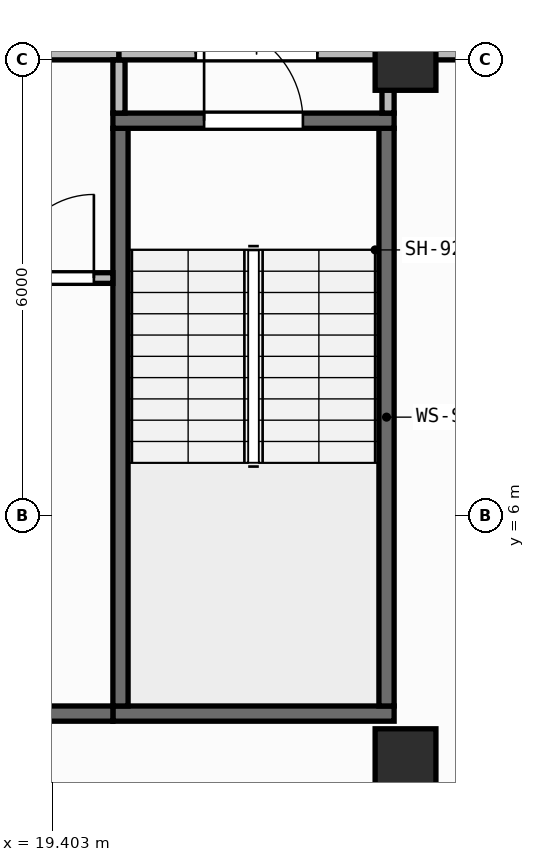
"""IFC4 building model, lengths in metres.
Left out: names, types, materials, properties, quantities, classifications, styles, units other than length and angle.
Written with IfcOpenShell. Run it as: python <this file> out.ifc"""

import sys

from ifc_helpers import new_model, si_unit, direction, frame, frame_2d, origin, origin_2d, place, context, subcontext, project, spatial, rectangle, extrude, element, fill, save


model = new_model("IFC4")
c1 = context("Model", 3, precision=1e-05, world=origin(), true_north=direction((0.0, 1.0)))
c2 = subcontext(c1, "Body", "Model", "MODEL_VIEW")
j1 = project(units=[si_unit("LENGTHUNIT", "METRE"), si_unit("PLANEANGLEUNIT", "RADIAN")], contexts=[c1])
p1 = place(None, origin())
s1 = spatial("IfcSite", under=j1, at=p1, CompositionType="ELEMENT")
p2 = place(p1, origin())
s2 = spatial("IfcBuilding", under=s1, at=p2, CompositionType="ELEMENT")
p3 = place(p2, frame((0.0, 0.0, 256.55)))
s3 = spatial("IfcBuildingStorey", under=s2, at=p3, CompositionType="ELEMENT", Elevation=256.55)
for number, where, z_axis, x_axis in (
    (1, (24.05, 2.8, 0.0), (0.0, 0.0, 1.0), (1.0, 0.0, 0.0)),
    (2, (24.05, 12.0, 0.0), (0.0, 0.0, 1.0), (1.0, 0.0, 0.0)),
):
    element("IfcColumn", number, at=place(p3, frame(where, z_axis=z_axis, x_axis=x_axis)), inside=s3, PredefinedType="COLUMN", context=c2, shape_type="SweptSolid", body=[
        extrude(rectangle(XDim=0.8, YDim=0.8, at=origin_2d()), origin(), (0.0, 0.0, 1.0), 3.95),
    ])
p4 = place(p3, frame((2.56, 0.173, 0.0), z_axis=(0.0, 0.0, 1.0), x_axis=(0.996798206282, 0.079958338856, 0.0)))
e3 = element("IfcWall", 3, at=p4, inside=s3, PredefinedType="STANDARD", context=c2, shape_type="SweptSolid", body=[
    extrude(rectangle(XDim=37.199, YDim=0.26, at=frame_2d((18.6, 0.0))), origin(), (0.0, 0.0, 1.0), 3.71),
])
p5 = place(p4, frame((17.4, 0.0, 0.9)))
e4 = element("IfcOpeningElement", 4, at=p5, cuts=e3, PredefinedType="OPENING", context=c2, shape_type="SweptSolid", body=[
    extrude(rectangle(XDim=2.4, YDim=1.65, at=frame_2d((1.2, 0.825))), frame((0.0, 0.14, 0.0), z_axis=(0.0, -1.0, 0.0), x_axis=(1.0, 0.0, 0.0)), (0.0, 0.0, 1.0), 0.28),
])
p6 = place(p3, frame((20.2, 3.4, 0.0), z_axis=(0.0, 0.0, 1.0), x_axis=(1.0, 0.0, 0.0)))
e5 = element("IfcWall", 5, at=p6, inside=s3, PredefinedType="SHEAR", context=c2, shape_type="SweptSolid", body=[
    extrude(rectangle(XDim=3.7, YDim=0.2, at=frame_2d((1.85, 0.0))), origin(), (0.0, 0.0, 1.0), 3.71),
])
for number, where, z_axis, x_axis in (
    (6, (20.3, 3.5, 0.0), (0.0, 0.0, 1.0), (0.0, 1.0, 0.0)),
    (7, (23.8, 3.5, 0.0), (0.0, 0.0, 1.0), (0.0, 1.0, 0.0)),
):
    element("IfcWall", number, at=place(p3, frame(where, z_axis=z_axis, x_axis=x_axis)), inside=s3, PredefinedType="SHEAR", context=c2, shape_type="SweptSolid", body=[
        extrude(rectangle(XDim=7.6, YDim=0.2, at=frame_2d((3.8, 0.0))), origin(), (0.0, 0.0, 1.0), 3.71),
    ])
p7 = place(p3, frame((20.2, 11.2, 0.0), z_axis=(0.0, 0.0, 1.0), x_axis=(1.0, 0.0, 0.0)))
e8 = element("IfcWall", 8, at=p7, inside=s3, PredefinedType="SHEAR", context=c2, shape_type="SweptSolid", body=[
    extrude(rectangle(XDim=3.7, YDim=0.2, at=frame_2d((1.85, 0.0))), origin(), (0.0, 0.0, 1.0), 3.71),
])
p8 = place(p7, frame((1.2, 0.0, 0.0)))
e9 = element("IfcOpeningElement", 9, at=p8, cuts=e8, PredefinedType="OPENING", context=c2, shape_type="SweptSolid", body=[
    extrude(rectangle(XDim=1.3, YDim=2.15, at=frame_2d((0.65, 1.075))), frame((0.0, 0.11, 0.0), z_axis=(0.0, -1.0, 0.0), x_axis=(1.0, 0.0, 0.0)), (0.0, 0.0, 1.0), 0.22),
])
p9 = place(p3, frame((6.5, 3.4, 0.0), z_axis=(0.0, 0.0, 1.0), x_axis=(1.0, 0.0, 0.0)))
e10 = element("IfcWall", 10, at=p9, inside=s3, PredefinedType="SHEAR", context=c2, shape_type="SweptSolid", body=[
    extrude(rectangle(XDim=13.7, YDim=0.2, at=frame_2d((6.85, 0.0))), origin(), (0.0, 0.0, 1.0), 3.71),
])
p10 = place(p3, frame((18.61, 9.13, 0.0), z_axis=(0.0, 0.0, 1.0), x_axis=(1.0, 0.0, 0.0)))
e11 = element("IfcWall", 11, at=p10, inside=s3, PredefinedType="PARTITIONING", context=c2, shape_type="SweptSolid", body=[
    extrude(rectangle(XDim=1.59, YDim=0.14, at=frame_2d((0.795, 0.0))), origin(), (0.0, 0.0, 1.0), 3.71),
])
p11 = place(p10, frame((0.24, 0.0, 0.0)))
e12 = element("IfcOpeningElement", 12, at=p11, cuts=e11, PredefinedType="OPENING", context=c2, shape_type="SweptSolid", body=[
    extrude(rectangle(XDim=1.1, YDim=2.1, at=frame_2d((0.55, 1.05))), frame((0.0, 0.08, 0.0), z_axis=(0.0, -1.0, 0.0), x_axis=(1.0, 0.0, 0.0)), (0.0, 0.0, 1.0), 0.16),
])
p12 = place(p3, frame((12.58, 12.08, 0.0), z_axis=(0.0, 0.0, 1.0), x_axis=(1.0, 0.0, 0.0)))
e13 = element("IfcWall", 13, at=p12, inside=s3, PredefinedType="PARTITIONING", context=c2, shape_type="SweptSolid", body=[
    extrude(rectangle(XDim=7.7, YDim=0.16, at=frame_2d((3.85, 0.0))), origin(), (0.0, 0.0, 1.0), 3.157),
])
p13 = place(p12, frame((3.05, 0.0, 0.0)))
e14 = element("IfcOpeningElement", 14, at=p13, cuts=e13, PredefinedType="OPENING", context=c2, shape_type="SweptSolid", body=[
    extrude(rectangle(XDim=1.6, YDim=2.05, at=frame_2d((0.8, 1.025))), frame((0.0, 0.09, 0.0), z_axis=(0.0, -1.0, 0.0), x_axis=(1.0, 0.0, 0.0)), (0.0, 0.0, 1.0), 0.18),
])
p14 = place(p3, frame((20.28, 11.3, 0.0), z_axis=(0.0, 0.0, 1.0), x_axis=(0.0, 1.0, 0.0)))
e15 = element("IfcWall", 15, at=p14, inside=s3, PredefinedType="PARTITIONING", context=c2, shape_type="SweptSolid", body=[
    extrude(rectangle(XDim=0.7, YDim=0.16, at=frame_2d((0.35, 0.0))), origin(), (0.0, 0.0, 1.0), 3.71),
])
p15 = place(p3, frame((20.28, 12.08, 0.0), z_axis=(0.0, 0.0, 1.0), x_axis=(1.0, 0.0, 0.0)))
e16 = element("IfcWall", 16, at=p15, inside=s3, PredefinedType="PARTITIONING", context=c2, shape_type="SweptSolid", body=[
    extrude(rectangle(XDim=3.62, YDim=0.16, at=frame_2d((1.81, 0.0))), origin(), (0.0, 0.0, 1.0), 3.157),
])
p16 = place(p15, frame((1.01, 0.0, 0.0)))
e17 = element("IfcOpeningElement", 17, at=p16, cuts=e16, PredefinedType="OPENING", context=c2, shape_type="SweptSolid", body=[
    extrude(rectangle(XDim=1.6, YDim=2.05, at=frame_2d((0.8, 1.025))), frame((0.0, 0.09, 0.0), z_axis=(0.0, -1.0, 0.0), x_axis=(1.0, 0.0, 0.0)), (0.0, 0.0, 1.0), 0.18),
])
p17 = place(p3, frame((23.82, 11.3, 0.0), z_axis=(0.0, 0.0, 1.0), x_axis=(0.0, 1.0, 0.0)))
e18 = element("IfcWall", 18, at=p17, inside=s3, PredefinedType="PARTITIONING", context=c2, shape_type="SweptSolid", body=[
    extrude(rectangle(XDim=0.7, YDim=0.16, at=frame_2d((0.35, 0.0))), origin(), (0.0, 0.0, 1.0), 3.71),
])
p18 = place(p3, frame((24.02, 12.08, 0.0), z_axis=(0.0, 0.0, 1.0), x_axis=(1.0, 0.0, 0.0)))
e19 = element("IfcWall", 19, at=p18, inside=s3, PredefinedType="PARTITIONING", context=c2, shape_type="SweptSolid", body=[
    extrude(rectangle(XDim=1.218, YDim=0.16, at=frame_2d((0.609, 0.0))), origin(), (0.0, 0.0, 1.0), 3.157),
])
p19 = place(p8, origin())
e20 = element("IfcDoor", 20, at=p19, inside=s3, OperationType="SINGLE_SWING_LEFT", PredefinedType="DOOR", context=c2, shape_type="SweptSolid", body=[
    extrude(rectangle(XDim=1.3, YDim=2.15, at=frame_2d((0.65, 1.075))), frame((0.0, 0.025, 0.0), z_axis=(0.0, -1.0, 0.0), x_axis=(1.0, 0.0, 0.0)), (0.0, 0.0, 1.0), 0.05),
])
fill(e9, e20)
p20 = place(p11, origin())
e21 = element("IfcDoor", 21, at=p20, inside=s3, OperationType="SINGLE_SWING_RIGHT", PredefinedType="DOOR", context=c2, shape_type="SweptSolid", body=[
    extrude(rectangle(XDim=1.1, YDim=2.1, at=frame_2d((0.55, 1.05))), frame((0.0, 0.025, 0.0), z_axis=(0.0, -1.0, 0.0), x_axis=(1.0, 0.0, 0.0)), (0.0, 0.0, 1.0), 0.05),
])
fill(e12, e21)
p21 = place(p16, origin())
e22 = element("IfcDoor", 22, at=p21, inside=s3, OperationType="DOUBLE_DOOR_SINGLE_SWING", PredefinedType="DOOR", context=c2, shape_type="SweptSolid", body=[
    extrude(rectangle(XDim=1.6, YDim=2.05, at=frame_2d((0.8, 1.025))), frame((0.0, 0.025, 0.0), z_axis=(0.0, -1.0, 0.0), x_axis=(1.0, 0.0, 0.0)), (0.0, 0.0, 1.0), 0.05),
])
fill(e17, e22)
save(model, sys.argv[1])
